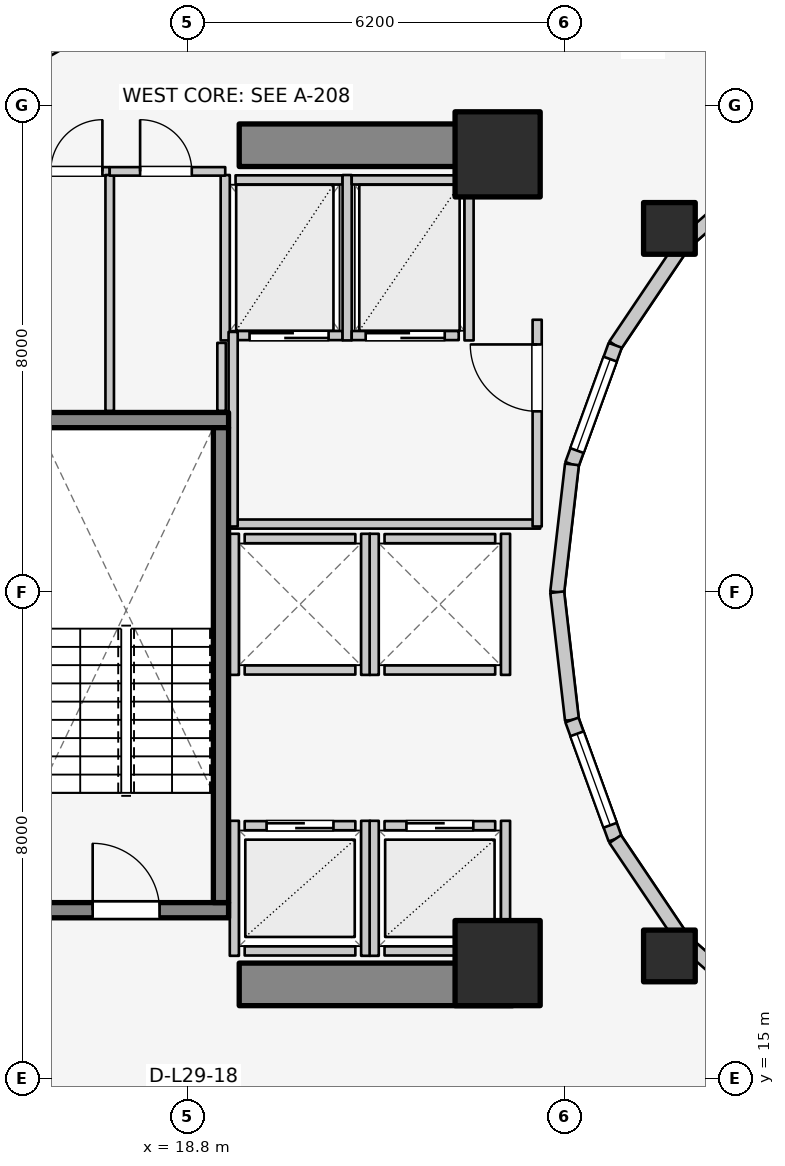
"""IFC4 building model, lengths in metres.
Left out: names, types, materials, properties, quantities, classifications, styles, units other than length and angle.
Written with IfcOpenShell. Run it as: python <this file> out.ifc"""

import sys

from ifc_helpers import new_model, si_unit, direction, frame, frame_2d, origin, origin_2d, place, context, subcontext, project, spatial, rectangle, extrude, element, fill, save


model = new_model("IFC4")
c1 = context("Model", 3, precision=1e-05, world=origin(), true_north=direction((0.0, 1.0)))
c2 = subcontext(c1, "Body", "Model", "MODEL_VIEW")
j1 = project(units=[si_unit("LENGTHUNIT", "METRE"), si_unit("PLANEANGLEUNIT", "RADIAN")], contexts=[c1])
p1 = place(None, origin())
s1 = spatial("IfcSite", under=j1, at=p1, CompositionType="ELEMENT")
p2 = place(p1, origin())
s2 = spatial("IfcBuilding", under=s1, at=p2, CompositionType="ELEMENT")
p3 = place(p2, frame((0.0, 0.0, 98.0)))
s3 = spatial("IfcBuildingStorey", under=s2, at=p3, CompositionType="ELEMENT", Elevation=98.0)
for number, where, z_axis, x_axis in (
    (1, (19.65, 16.55, 0.0), (0.0, 0.0, 1.0), (1.0, 0.0, 0.0)),
    (2, (19.65, 30.35, 0.0), (0.0, 0.0, 1.0), (1.0, 0.0, 0.0)),
):
    element("IfcWall", number, at=place(p3, frame(where, z_axis=z_axis, x_axis=x_axis)), inside=s3, PredefinedType="SHEAR", context=c2, shape_type="SweptSolid", body=[
        extrude(rectangle(XDim=4.5, YDim=0.7, at=frame_2d((2.25, 0.0))), origin(), (0.0, 0.0, 1.0), 3.1),
    ])
p4 = place(p3, frame((16.105, 17.77, 0.0), z_axis=(0.0, 0.0, 1.0), x_axis=(1.0, 0.0, 0.0)))
e3 = element("IfcWall", 3, at=p4, inside=s3, PredefinedType="SOLIDWALL", context=c2, shape_type="SweptSolid", body=[
    extrude(rectangle(XDim=3.37, YDim=0.25, at=frame_2d((1.685, 0.0))), origin(), (0.0, 0.0, 1.0), 3.1),
])
p5 = place(p4, frame((1.135, 0.0, 0.0)))
e4 = element("IfcOpeningElement", 4, at=p5, cuts=e3, PredefinedType="OPENING", context=c2, shape_type="SweptSolid", body=[
    extrude(rectangle(XDim=1.1, YDim=2.1, at=frame_2d((0.55, 1.05))), frame((0.0, 0.135, 0.0), z_axis=(0.0, -1.0, 0.0), x_axis=(1.0, 0.0, 0.0)), (0.0, 0.0, 1.0), 0.27),
])
p6 = place(p3, frame((16.105, 25.83, 0.0), z_axis=(0.0, 0.0, 1.0), x_axis=(1.0, 0.0, 0.0)))
e5 = element("IfcWall", 5, at=p6, inside=s3, PredefinedType="SOLIDWALL", context=c2, shape_type="SweptSolid", body=[
    extrude(rectangle(XDim=3.37, YDim=0.25, at=frame_2d((1.685, 0.0))), origin(), (0.0, 0.0, 1.0), 3.1),
])
p7 = place(p3, frame((19.35, 17.895, 0.0), z_axis=(0.0, 0.0, 1.0), x_axis=(0.0, 1.0, 0.0)))
e6 = element("IfcWall", 6, at=p7, inside=s3, PredefinedType="SOLIDWALL", context=c2, shape_type="SweptSolid", body=[
    extrude(rectangle(XDim=7.81, YDim=0.25, at=frame_2d((3.905, 0.0))), origin(), (0.0, 0.0, 1.0), 3.1),
])
for number, where, z_axis, x_axis in (
    (7, (23.9, 16.9, 0.0), (0.0, 0.0, 1.0), (1.0, 0.0, 0.0)),
    (8, (23.9, 30.2, 0.0), (0.0, 0.0, 1.0), (1.0, 0.0, 0.0)),
):
    element("IfcColumn", number, at=place(p3, frame(where, z_axis=z_axis, x_axis=x_axis)), inside=s3, PredefinedType="COLUMN", context=c2, shape_type="SweptSolid", body=[
        extrude(rectangle(XDim=1.4, YDim=1.4, at=origin_2d()), origin(), (0.0, 0.0, 1.0), 3.1),
    ])
for number, where, z_axis, x_axis in (
    (9, (26.725, 28.982, 0.0), (0.0, 0.0, 1.0), (1.0, 0.0, 0.0)),
    (10, (26.725, 17.018, 0.0), (0.0, 0.0, 1.0), (1.0, 0.0, 0.0)),
):
    element("IfcColumn", number, at=place(p3, frame(where, z_axis=z_axis, x_axis=x_axis)), inside=s3, PredefinedType="COLUMN", context=c2, shape_type="SweptSolid", body=[
        extrude(rectangle(XDim=0.85, YDim=0.85, at=origin_2d()), origin(), (0.0, 0.0, 1.0), 3.1),
    ])
p8 = place(p3, frame((28.44, 30.032, 0.0), z_axis=(0.0, 0.0, 1.0), x_axis=(-0.752576694707, -0.658504607869, 0.0)))
e11 = element("IfcWall", 11, at=p8, inside=s3, PredefinedType="STANDARD", context=c2, shape_type="SweptSolid", body=[
    extrude(rectangle(XDim=1.959, YDim=0.23, at=frame_2d((0.98, 0.0))), origin(), (0.0, 0.0, 1.0), 2.16),
])
p9 = place(p3, frame((26.965, 28.742, 0.0), z_axis=(0.0, 0.0, 1.0), x_axis=(-0.558197800898, -0.829707909492, 0.0)))
e12 = element("IfcWall", 12, at=p9, inside=s3, PredefinedType="STANDARD", context=c2, shape_type="SweptSolid", body=[
    extrude(rectangle(XDim=2.027, YDim=0.23, at=frame_2d((1.013, 0.0))), origin(), (0.0, 0.0, 1.0), 2.16),
])
p10 = place(p3, frame((25.834, 27.06, 0.0), z_axis=(0.0, 0.0, 1.0), x_axis=(-0.341423187295, -0.93990968033, 0.0)))
e13 = element("IfcWall", 13, at=p10, inside=s3, PredefinedType="STANDARD", context=c2, shape_type="SweptSolid", body=[
    extrude(rectangle(XDim=2.084, YDim=0.23, at=frame_2d((1.042, 0.0))), origin(), (0.0, 0.0, 1.0), 2.84),
])
p11 = place(p10, frame((0.242, 0.0, 0.85)))
e14 = element("IfcOpeningElement", 14, at=p11, cuts=e13, PredefinedType="OPENING", context=c2, shape_type="SweptSolid", body=[
    extrude(rectangle(XDim=1.6, YDim=1.65, at=frame_2d((0.8, 0.825))), frame((0.0, 0.125, 0.0), z_axis=(0.0, -1.0, 0.0), x_axis=(1.0, 0.0, 0.0)), (0.0, 0.0, 1.0), 0.25),
])
for number, where, z_axis, x_axis in (
    (15, (25.123, 25.102, 0.0), (0.0, 0.0, 1.0), (-0.115, -0.993, 0.0)),
    (16, (24.88, 23.0, 0.0), (0.0, 0.0, 1.0), (0.115, -0.993, 0.0)),
):
    element("IfcWall", number, at=place(p3, frame(where, z_axis=z_axis, x_axis=x_axis)), inside=s3, PredefinedType="STANDARD", context=c2, shape_type="SweptSolid", body=[
        extrude(rectangle(XDim=2.115, YDim=0.23, at=frame_2d((1.058, 0.0))), origin(), (0.0, 0.0, 1.0), 2.84),
    ])
p12 = place(p3, frame((25.123, 20.898, 0.0), z_axis=(0.0, 0.0, 1.0), x_axis=(0.341423187295, -0.93990968033, 0.0)))
e17 = element("IfcWall", 17, at=p12, inside=s3, PredefinedType="STANDARD", context=c2, shape_type="SweptSolid", body=[
    extrude(rectangle(XDim=2.084, YDim=0.23, at=frame_2d((1.042, 0.0))), origin(), (0.0, 0.0, 1.0), 2.84),
])
p13 = place(p12, frame((0.242, 0.0, 0.85)))
e18 = element("IfcOpeningElement", 18, at=p13, cuts=e17, PredefinedType="OPENING", context=c2, shape_type="SweptSolid", body=[
    extrude(rectangle(XDim=1.6, YDim=1.65, at=frame_2d((0.8, 0.825))), frame((0.0, 0.125, 0.0), z_axis=(0.0, -1.0, 0.0), x_axis=(1.0, 0.0, 0.0)), (0.0, 0.0, 1.0), 0.25),
])
p14 = place(p3, frame((25.834, 18.94, 0.0), z_axis=(0.0, 0.0, 1.0), x_axis=(0.558197800898, -0.829707909492, 0.0)))
e19 = element("IfcWall", 19, at=p14, inside=s3, PredefinedType="STANDARD", context=c2, shape_type="SweptSolid", body=[
    extrude(rectangle(XDim=2.027, YDim=0.23, at=frame_2d((1.013, 0.0))), origin(), (0.0, 0.0, 1.0), 2.16),
])
p15 = place(p3, frame((26.965, 17.258, 0.0), z_axis=(0.0, 0.0, 1.0), x_axis=(0.752576694707, -0.658504607869, 0.0)))
e20 = element("IfcWall", 20, at=p15, inside=s3, PredefinedType="STANDARD", context=c2, shape_type="SweptSolid", body=[
    extrude(rectangle(XDim=1.959, YDim=0.23, at=frame_2d((0.98, 0.0))), origin(), (0.0, 0.0, 1.0), 2.16),
])
p16 = place(p3, frame((19.74, 19.16, 0.0), z_axis=(0.0, 0.0, 1.0), x_axis=(1.0, 0.0, 0.0)))
e21 = element("IfcWall", 21, at=p16, inside=s3, PredefinedType="SOLIDWALL", context=c2, shape_type="SweptSolid", body=[
    extrude(rectangle(XDim=1.82, YDim=0.15, at=frame_2d((0.91, 0.0))), origin(), (0.0, 0.0, 1.0), 2.855),
])
p17 = place(p16, frame((0.36, 0.0, 0.0)))
e22 = element("IfcOpeningElement", 22, at=p17, cuts=e21, PredefinedType="OPENING", context=c2, shape_type="SweptSolid", body=[
    extrude(rectangle(XDim=1.1, YDim=2.1, at=frame_2d((0.55, 1.05))), frame((0.0, 0.085, 0.0), z_axis=(0.0, -1.0, 0.0), x_axis=(1.0, 0.0, 0.0)), (0.0, 0.0, 1.0), 0.17),
])
p18 = place(p3, frame((19.74, 17.1, 0.0), z_axis=(0.0, 0.0, 1.0), x_axis=(1.0, 0.0, 0.0)))
e23 = element("IfcWall", 23, at=p18, inside=s3, PredefinedType="SOLIDWALL", context=c2, shape_type="SweptSolid", body=[
    extrude(rectangle(XDim=1.82, YDim=0.15, at=frame_2d((0.91, 0.0))), origin(), (0.0, 0.0, 1.0), 2.855),
])
p19 = place(p3, frame((19.57, 17.02, 0.0), z_axis=(0.0, 0.0, 1.0), x_axis=(0.0, 1.0, 0.0)))
e24 = element("IfcWall", 24, at=p19, inside=s3, PredefinedType="SOLIDWALL", context=c2, shape_type="SweptSolid", body=[
    extrude(rectangle(XDim=2.22, YDim=0.15, at=frame_2d((1.11, 0.0))), origin(), (0.0, 0.0, 1.0), 2.12),
])
p20 = place(p3, frame((21.73, 17.02, 0.0), z_axis=(0.0, 0.0, 1.0), x_axis=(0.0, 1.0, 0.0)))
e25 = element("IfcWall", 25, at=p20, inside=s3, PredefinedType="SOLIDWALL", context=c2, shape_type="SweptSolid", body=[
    extrude(rectangle(XDim=2.22, YDim=0.15, at=frame_2d((1.11, 0.0))), origin(), (0.0, 0.0, 1.0), 2.855),
])
p21 = place(p3, frame((22.04, 19.16, 0.0), z_axis=(0.0, 0.0, 1.0), x_axis=(1.0, 0.0, 0.0)))
e26 = element("IfcWall", 26, at=p21, inside=s3, PredefinedType="SOLIDWALL", context=c2, shape_type="SweptSolid", body=[
    extrude(rectangle(XDim=1.82, YDim=0.15, at=frame_2d((0.91, 0.0))), origin(), (0.0, 0.0, 1.0), 2.12),
])
p22 = place(p21, frame((0.36, 0.0, 0.0)))
e27 = element("IfcOpeningElement", 27, at=p22, cuts=e26, PredefinedType="OPENING", context=c2, shape_type="SweptSolid", body=[
    extrude(rectangle(XDim=1.1, YDim=2.1, at=frame_2d((0.55, 1.05))), frame((0.0, 0.085, 0.0), z_axis=(0.0, -1.0, 0.0), x_axis=(1.0, 0.0, 0.0)), (0.0, 0.0, 1.0), 0.17),
])
p23 = place(p3, frame((22.04, 17.1, 0.0), z_axis=(0.0, 0.0, 1.0), x_axis=(1.0, 0.0, 0.0)))
e28 = element("IfcWall", 28, at=p23, inside=s3, PredefinedType="SOLIDWALL", context=c2, shape_type="SweptSolid", body=[
    extrude(rectangle(XDim=1.82, YDim=0.15, at=frame_2d((0.91, 0.0))), origin(), (0.0, 0.0, 1.0), 2.12),
])
p24 = place(p3, frame((21.87, 17.02, 0.0), z_axis=(0.0, 0.0, 1.0), x_axis=(0.0, 1.0, 0.0)))
e29 = element("IfcWall", 29, at=p24, inside=s3, PredefinedType="SOLIDWALL", context=c2, shape_type="SweptSolid", body=[
    extrude(rectangle(XDim=2.22, YDim=0.15, at=frame_2d((1.11, 0.0))), origin(), (0.0, 0.0, 1.0), 2.855),
])
p25 = place(p3, frame((24.03, 17.02, 0.0), z_axis=(0.0, 0.0, 1.0), x_axis=(0.0, 1.0, 0.0)))
e30 = element("IfcWall", 30, at=p25, inside=s3, PredefinedType="SOLIDWALL", context=c2, shape_type="SweptSolid", body=[
    extrude(rectangle(XDim=2.22, YDim=0.15, at=frame_2d((1.11, 0.0))), origin(), (0.0, 0.0, 1.0), 2.12),
])
for number, where, z_axis, x_axis in (
    (31, (19.74, 21.72, 0.0), (0.0, 0.0, 1.0), (1.0, 0.0, 0.0)),
    (32, (19.74, 23.88, 0.0), (0.0, 0.0, 1.0), (1.0, 0.0, 0.0)),
):
    element("IfcWall", number, at=place(p3, frame(where, z_axis=z_axis, x_axis=x_axis)), inside=s3, PredefinedType="SOLIDWALL", context=c2, shape_type="SweptSolid", body=[
        extrude(rectangle(XDim=1.82, YDim=0.15, at=frame_2d((0.91, 0.0))), origin(), (0.0, 0.0, 1.0), 2.855),
    ])
for number, where, z_axis, x_axis in (
    (33, (19.57, 21.64, 0.0), (0.0, 0.0, 1.0), (0.0, 1.0, 0.0)),
    (34, (21.73, 21.64, 0.0), (0.0, 0.0, 1.0), (0.0, 1.0, 0.0)),
):
    element("IfcWall", number, at=place(p3, frame(where, z_axis=z_axis, x_axis=x_axis)), inside=s3, PredefinedType="SOLIDWALL", context=c2, shape_type="SweptSolid", body=[
        extrude(rectangle(XDim=2.32, YDim=0.15, at=frame_2d((1.16, 0.0))), origin(), (0.0, 0.0, 1.0), 2.855),
    ])
for number, where, z_axis, x_axis in (
    (35, (22.04, 21.72, 0.0), (0.0, 0.0, 1.0), (1.0, 0.0, 0.0)),
    (36, (22.04, 23.88, 0.0), (0.0, 0.0, 1.0), (1.0, 0.0, 0.0)),
):
    element("IfcWall", number, at=place(p3, frame(where, z_axis=z_axis, x_axis=x_axis)), inside=s3, PredefinedType="SOLIDWALL", context=c2, shape_type="SweptSolid", body=[
        extrude(rectangle(XDim=1.82, YDim=0.15, at=frame_2d((0.91, 0.0))), origin(), (0.0, 0.0, 1.0), 2.12),
    ])
p26 = place(p3, frame((21.87, 21.64, 0.0), z_axis=(0.0, 0.0, 1.0), x_axis=(0.0, 1.0, 0.0)))
e37 = element("IfcWall", 37, at=p26, inside=s3, PredefinedType="SOLIDWALL", context=c2, shape_type="SweptSolid", body=[
    extrude(rectangle(XDim=2.32, YDim=0.15, at=frame_2d((1.16, 0.0))), origin(), (0.0, 0.0, 1.0), 2.855),
])
p27 = place(p3, frame((24.03, 21.64, 0.0), z_axis=(0.0, 0.0, 1.0), x_axis=(0.0, 1.0, 0.0)))
e38 = element("IfcWall", 38, at=p27, inside=s3, PredefinedType="SOLIDWALL", context=c2, shape_type="SweptSolid", body=[
    extrude(rectangle(XDim=2.32, YDim=0.15, at=frame_2d((1.16, 0.0))), origin(), (0.0, 0.0, 1.0), 2.12),
])
p28 = place(p3, frame((19.59, 27.22, 0.0), z_axis=(0.0, 0.0, 1.0), x_axis=(1.0, 0.0, 0.0)))
e39 = element("IfcWall", 39, at=p28, inside=s3, PredefinedType="SOLIDWALL", context=c2, shape_type="SweptSolid", body=[
    extrude(rectangle(XDim=1.76, YDim=0.15, at=frame_2d((0.88, 0.0))), origin(), (0.0, 0.0, 1.0), 2.855),
])
p29 = place(p28, frame((0.23, 0.0, 0.0)))
e40 = element("IfcOpeningElement", 40, at=p29, cuts=e39, PredefinedType="OPENING", context=c2, shape_type="SweptSolid", body=[
    extrude(rectangle(XDim=1.3, YDim=2.1, at=frame_2d((0.65, 1.05))), frame((0.0, 0.085, 0.0), z_axis=(0.0, -1.0, 0.0), x_axis=(1.0, 0.0, 0.0)), (0.0, 0.0, 1.0), 0.17),
])
p30 = place(p3, frame((19.59, 29.78, 0.0), z_axis=(0.0, 0.0, 1.0), x_axis=(1.0, 0.0, 0.0)))
e41 = element("IfcWall", 41, at=p30, inside=s3, PredefinedType="SOLIDWALL", context=c2, shape_type="SweptSolid", body=[
    extrude(rectangle(XDim=1.76, YDim=0.15, at=frame_2d((0.88, 0.0))), origin(), (0.0, 0.0, 1.0), 2.855),
])
for number, where, z_axis, x_axis in (
    (42, (19.42, 27.14, 0.0), (0.0, 0.0, 1.0), (0.0, 1.0, 0.0)),
    (43, (21.425, 27.14, 0.0), (0.0, 0.0, 1.0), (0.0, 1.0, 0.0)),
):
    element("IfcWall", number, at=place(p3, frame(where, z_axis=z_axis, x_axis=x_axis)), inside=s3, PredefinedType="SOLIDWALL", context=c2, shape_type="SweptSolid", body=[
        extrude(rectangle(XDim=2.72, YDim=0.15, at=frame_2d((1.36, 0.0))), origin(), (0.0, 0.0, 1.0), 2.855),
    ])
p31 = place(p3, frame((21.5, 27.22, 0.0), z_axis=(0.0, 0.0, 1.0), x_axis=(1.0, 0.0, 0.0)))
e44 = element("IfcWall", 44, at=p31, inside=s3, PredefinedType="SOLIDWALL", context=c2, shape_type="SweptSolid", body=[
    extrude(rectangle(XDim=1.76, YDim=0.15, at=frame_2d((0.88, 0.0))), origin(), (0.0, 0.0, 1.0), 2.855),
])
p32 = place(p31, frame((0.23, 0.0, 0.0)))
e45 = element("IfcOpeningElement", 45, at=p32, cuts=e44, PredefinedType="OPENING", context=c2, shape_type="SweptSolid", body=[
    extrude(rectangle(XDim=1.3, YDim=2.1, at=frame_2d((0.65, 1.05))), frame((0.0, 0.085, 0.0), z_axis=(0.0, -1.0, 0.0), x_axis=(1.0, 0.0, 0.0)), (0.0, 0.0, 1.0), 0.17),
])
p33 = place(p3, frame((21.5, 29.78, 0.0), z_axis=(0.0, 0.0, 1.0), x_axis=(1.0, 0.0, 0.0)))
e46 = element("IfcWall", 46, at=p33, inside=s3, PredefinedType="SOLIDWALL", context=c2, shape_type="SweptSolid", body=[
    extrude(rectangle(XDim=1.76, YDim=0.15, at=frame_2d((0.88, 0.0))), origin(), (0.0, 0.0, 1.0), 2.855),
])
p34 = place(p3, frame((23.43, 27.14, 0.0), z_axis=(0.0, 0.0, 1.0), x_axis=(0.0, 1.0, 0.0)))
e47 = element("IfcWall", 47, at=p34, inside=s3, PredefinedType="SOLIDWALL", context=c2, shape_type="SweptSolid", body=[
    extrude(rectangle(XDim=2.72, YDim=0.15, at=frame_2d((1.36, 0.0))), origin(), (0.0, 0.0, 1.0), 2.855),
])
p35 = place(p3, frame((19.52, 24.12, 0.0), z_axis=(0.0, 0.0, 1.0), x_axis=(1.0, 0.0, 0.0)))
e48 = element("IfcWall", 48, at=p35, inside=s3, PredefinedType="PARTITIONING", context=c2, shape_type="SweptSolid", body=[
    extrude(rectangle(XDim=5.08, YDim=0.15, at=frame_2d((2.54, 0.0))), origin(), (0.0, 0.0, 1.0), 2.12),
])
p36 = place(p3, frame((19.55, 24.08, 0.0), z_axis=(0.0, 0.0, 1.0), x_axis=(0.0, 1.0, 0.0)))
e49 = element("IfcWall", 49, at=p36, inside=s3, PredefinedType="PARTITIONING", context=c2, shape_type="SweptSolid", body=[
    extrude(rectangle(XDim=3.2, YDim=0.15, at=frame_2d((1.6, 0.0))), origin(), (0.0, 0.0, 1.0), 2.855),
])
p37 = place(p3, frame((24.55, 24.08, 0.0), z_axis=(0.0, 0.0, 1.0), x_axis=(0.0, 1.0, 0.0)))
e50 = element("IfcWall", 50, at=p37, inside=s3, PredefinedType="PARTITIONING", context=c2, shape_type="SweptSolid", body=[
    extrude(rectangle(XDim=3.4, YDim=0.15, at=frame_2d((1.7, 0.0))), origin(), (0.0, 0.0, 1.0), 2.855),
])
p38 = place(p37, frame((1.894, 0.0, 0.0)))
e51 = element("IfcOpeningElement", 51, at=p38, cuts=e50, PredefinedType="OPENING", context=c2, shape_type="SweptSolid", body=[
    extrude(rectangle(XDim=1.1, YDim=2.1, at=frame_2d((0.55, 1.05))), frame((0.0, 0.085, 0.0), z_axis=(0.0, -1.0, 0.0), x_axis=(1.0, 0.0, 0.0)), (0.0, 0.0, 1.0), 0.17),
])
p39 = place(p3, frame((16.12, 29.92, 0.0), z_axis=(0.0, 0.0, 1.0), x_axis=(1.0, 0.0, 0.0)))
e52 = element("IfcWall", 52, at=p39, inside=s3, PredefinedType="PLUMBINGWALL", context=c2, shape_type="SweptSolid", body=[
    extrude(rectangle(XDim=1.4, YDim=0.14, at=frame_2d((0.7, 0.0))), origin(), (0.0, 0.0, 1.0), 2.855),
])
p40 = place(p39, frame((0.43, 0.0, 0.0)))
e53 = element("IfcOpeningElement", 53, at=p40, cuts=e52, PredefinedType="OPENING", context=c2, shape_type="SweptSolid", body=[
    extrude(rectangle(XDim=0.85, YDim=2.05, at=frame_2d((0.425, 1.025))), frame((0.0, 0.08, 0.0), z_axis=(0.0, -1.0, 0.0), x_axis=(1.0, 0.0, 0.0)), (0.0, 0.0, 1.0), 0.16),
])
p41 = place(p3, frame((17.52, 25.98, 0.0), z_axis=(0.0, 0.0, 1.0), x_axis=(0.0, 1.0, 0.0)))
e54 = element("IfcWall", 54, at=p41, inside=s3, PredefinedType="PLUMBINGWALL", context=c2, shape_type="SweptSolid", body=[
    extrude(rectangle(XDim=3.88, YDim=0.14, at=frame_2d((1.94, 0.0))), origin(), (0.0, 0.0, 1.0), 2.855),
])
p42 = place(p3, frame((17.52, 29.92, 0.0), z_axis=(0.0, 0.0, 1.0), x_axis=(1.0, 0.0, 0.0)))
e55 = element("IfcWall", 55, at=p42, inside=s3, PredefinedType="PLUMBINGWALL", context=c2, shape_type="SweptSolid", body=[
    extrude(rectangle(XDim=1.9, YDim=0.14, at=frame_2d((0.95, 0.0))), origin(), (0.0, 0.0, 1.0), 2.855),
])
p43 = place(p42, frame((0.5, 0.0, 0.0)))
e56 = element("IfcOpeningElement", 56, at=p43, cuts=e55, PredefinedType="OPENING", context=c2, shape_type="SweptSolid", body=[
    extrude(rectangle(XDim=0.85, YDim=2.05, at=frame_2d((0.425, 1.025))), frame((0.0, 0.08, 0.0), z_axis=(0.0, -1.0, 0.0), x_axis=(1.0, 0.0, 0.0)), (0.0, 0.0, 1.0), 0.16),
])
p44 = place(p3, frame((19.36, 25.98, 0.0), z_axis=(0.0, 0.0, 1.0), x_axis=(0.0, 1.0, 0.0)))
e57 = element("IfcWall", 57, at=p44, inside=s3, PredefinedType="PLUMBINGWALL", context=c2, shape_type="SweptSolid", body=[
    extrude(rectangle(XDim=1.12, YDim=0.14, at=frame_2d((0.56, 0.0))), origin(), (0.0, 0.0, 1.0), 2.855),
])
p45 = place(p3, frame((17.243, 32.305, 0.0), z_axis=(0.0, 0.0, 1.0), x_axis=(-0.867991349648, -0.496579315857, 0.0)))
e58 = element("IfcWall", 58, at=p45, inside=s3, PredefinedType="PARTITIONING", context=c2, shape_type="SweptSolid", body=[
    extrude(rectangle(XDim=2.567, YDim=0.15, at=frame_2d((1.283, 0.0))), origin(), (0.0, 0.0, 1.0), 2.142),
])
p46 = place(p11, origin())
e59 = element("IfcWindow", 59, at=p46, inside=s3, PartitioningType="SINGLE_PANEL", PredefinedType="WINDOW", context=c2, shape_type="SweptSolid", body=[
    extrude(rectangle(XDim=1.6, YDim=1.65, at=frame_2d((0.8, 0.825))), frame((0.0, 0.03, 0.0), z_axis=(0.0, -1.0, 0.0), x_axis=(1.0, 0.0, 0.0)), (0.0, 0.0, 1.0), 0.06),
])
fill(e14, e59)
p47 = place(p13, origin())
e60 = element("IfcWindow", 60, at=p47, inside=s3, PartitioningType="SINGLE_PANEL", PredefinedType="WINDOW", context=c2, shape_type="SweptSolid", body=[
    extrude(rectangle(XDim=1.6, YDim=1.65, at=frame_2d((0.8, 0.825))), frame((0.0, 0.03, 0.0), z_axis=(0.0, -1.0, 0.0), x_axis=(1.0, 0.0, 0.0)), (0.0, 0.0, 1.0), 0.06),
])
fill(e18, e60)
p48 = place(p5, origin())
e61 = element("IfcDoor", 61, at=p48, inside=s3, OperationType="SINGLE_SWING_LEFT", PredefinedType="DOOR", context=c2, shape_type="SweptSolid", body=[
    extrude(rectangle(XDim=1.1, YDim=2.1, at=frame_2d((0.55, 1.05))), frame((0.0, 0.025, 0.0), z_axis=(0.0, -1.0, 0.0), x_axis=(1.0, 0.0, 0.0)), (0.0, 0.0, 1.0), 0.05),
])
fill(e4, e61)
p49 = place(p17, origin())
e62 = element("IfcDoor", 62, at=p49, inside=s3, OperationType="DOUBLE_DOOR_SLIDING", PredefinedType="DOOR", context=c2, shape_type="SweptSolid", body=[
    extrude(rectangle(XDim=1.1, YDim=2.1, at=frame_2d((0.55, 1.05))), frame((0.0, 0.025, 0.0), z_axis=(0.0, -1.0, 0.0), x_axis=(1.0, 0.0, 0.0)), (0.0, 0.0, 1.0), 0.05),
])
fill(e22, e62)
p50 = place(p22, origin())
e63 = element("IfcDoor", 63, at=p50, inside=s3, OperationType="DOUBLE_DOOR_SLIDING", PredefinedType="DOOR", context=c2, shape_type="SweptSolid", body=[
    extrude(rectangle(XDim=1.1, YDim=2.1, at=frame_2d((0.55, 1.05))), frame((0.0, 0.025, 0.0), z_axis=(0.0, -1.0, 0.0), x_axis=(1.0, 0.0, 0.0)), (0.0, 0.0, 1.0), 0.05),
])
fill(e27, e63)
p51 = place(p29, origin())
e64 = element("IfcDoor", 64, at=p51, inside=s3, OperationType="DOUBLE_DOOR_SLIDING", PredefinedType="DOOR", context=c2, shape_type="SweptSolid", body=[
    extrude(rectangle(XDim=1.3, YDim=2.1, at=frame_2d((0.65, 1.05))), frame((0.0, 0.025, 0.0), z_axis=(0.0, -1.0, 0.0), x_axis=(1.0, 0.0, 0.0)), (0.0, 0.0, 1.0), 0.05),
])
fill(e40, e64)
p52 = place(p32, origin())
e65 = element("IfcDoor", 65, at=p52, inside=s3, OperationType="DOUBLE_DOOR_SLIDING", PredefinedType="DOOR", context=c2, shape_type="SweptSolid", body=[
    extrude(rectangle(XDim=1.3, YDim=2.1, at=frame_2d((0.65, 1.05))), frame((0.0, 0.025, 0.0), z_axis=(0.0, -1.0, 0.0), x_axis=(1.0, 0.0, 0.0)), (0.0, 0.0, 1.0), 0.05),
])
fill(e45, e65)
p53 = place(p38, origin())
e66 = element("IfcDoor", 66, at=p53, inside=s3, OperationType="SINGLE_SWING_RIGHT", PredefinedType="DOOR", context=c2, shape_type="SweptSolid", body=[
    extrude(rectangle(XDim=1.1, YDim=2.1, at=frame_2d((0.55, 1.05))), frame((0.0, 0.025, 0.0), z_axis=(0.0, -1.0, 0.0), x_axis=(1.0, 0.0, 0.0)), (0.0, 0.0, 1.0), 0.05),
])
fill(e51, e66)
p54 = place(p40, origin())
e67 = element("IfcDoor", 67, at=p54, inside=s3, OperationType="SINGLE_SWING_RIGHT", PredefinedType="DOOR", context=c2, shape_type="SweptSolid", body=[
    extrude(rectangle(XDim=0.85, YDim=2.05, at=frame_2d((0.425, 1.025))), frame((0.0, 0.025, 0.0), z_axis=(0.0, -1.0, 0.0), x_axis=(1.0, 0.0, 0.0)), (0.0, 0.0, 1.0), 0.05),
])
fill(e53, e67)
p55 = place(p43, origin())
e68 = element("IfcDoor", 68, at=p55, inside=s3, OperationType="SINGLE_SWING_LEFT", PredefinedType="DOOR", context=c2, shape_type="SweptSolid", body=[
    extrude(rectangle(XDim=0.85, YDim=2.05, at=frame_2d((0.425, 1.025))), frame((0.0, 0.025, 0.0), z_axis=(0.0, -1.0, 0.0), x_axis=(1.0, 0.0, 0.0)), (0.0, 0.0, 1.0), 0.05),
])
fill(e56, e68)
save(model, sys.argv[1])
